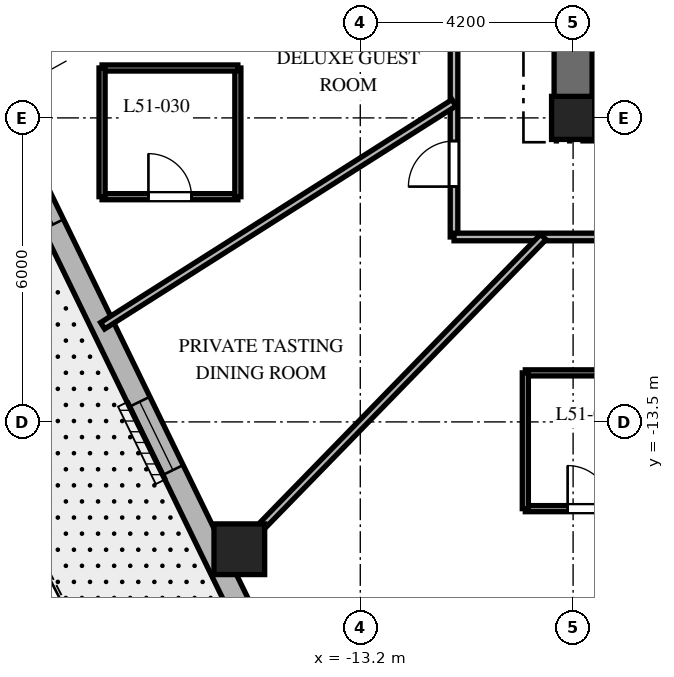
"""IFC4 building model, lengths in metres.
Left out: names, types, materials, properties, quantities, classifications, styles, units other than length and angle.
Written with IfcOpenShell. Run it as: python <this file> out.ifc"""

import sys

from ifc_helpers import new_model, si_unit, direction, frame, frame_2d, origin, origin_2d, place, context, subcontext, project, spatial, rectangle, extrude, element, fill, save


model = new_model("IFC4")
c1 = context("Model", 3, precision=1e-05, world=origin(), true_north=direction((0.0, 1.0)))
c2 = subcontext(c1, "Body", "Model", "MODEL_VIEW")
j1 = project(units=[si_unit("LENGTHUNIT", "METRE"), si_unit("PLANEANGLEUNIT", "RADIAN")], contexts=[c1])
p1 = place(None, origin())
s1 = spatial("IfcSite", under=j1, at=p1, CompositionType="ELEMENT")
p2 = place(p1, origin())
s2 = spatial("IfcBuilding", under=s1, at=p2, CompositionType="ELEMENT")
p3 = place(p2, frame((0.0, 0.0, 206.5)))
s3 = spatial("IfcBuildingStorey", under=s2, at=p3, CompositionType="ELEMENT", Elevation=206.5)
p4 = place(p3, frame((-9.375, -7.5, 0.0), z_axis=(0.0, 0.0, 1.0), x_axis=(1.0, 0.0, 0.0)))
e1 = element("IfcWall", 1, at=p4, inside=s3, PredefinedType="SHEAR", context=c2, shape_type="SweptSolid", body=[
    extrude(rectangle(XDim=18.75, YDim=0.75, at=frame_2d((9.375, 0.0))), origin(), (0.0, 0.0, 1.0), 3.8),
])
p5 = place(p4, frame((9.425, 0.0, 0.0)))
e2 = element("IfcOpeningElement", 2, at=p5, cuts=e1, PredefinedType="OPENING", context=c2, shape_type="SweptSolid", body=[
    extrude(rectangle(XDim=1.0, YDim=2.15, at=frame_2d((0.5, 1.075))), frame((0.0, 0.385, 0.0), z_axis=(0.0, -1.0, 0.0), x_axis=(1.0, 0.0, 0.0)), (0.0, 0.0, 1.0), 0.77),
])
p6 = place(p3, frame((-9.0, -7.125, 0.0), z_axis=(0.0, 0.0, 1.0), x_axis=(0.0, 1.0, 0.0)))
e3 = element("IfcWall", 3, at=p6, inside=s3, PredefinedType="SHEAR", context=c2, shape_type="SweptSolid", body=[
    extrude(rectangle(XDim=14.25, YDim=0.75, at=frame_2d((7.125, 0.0))), origin(), (0.0, 0.0, 1.0), 3.8),
])
p7 = place(p6, frame((10.25, 0.0, 0.0)))
e4 = element("IfcOpeningElement", 4, at=p7, cuts=e3, PredefinedType="OPENING", context=c2, shape_type="SweptSolid", body=[
    extrude(rectangle(XDim=1.05, YDim=2.15, at=frame_2d((0.525, 1.075))), frame((0.0, 0.385, 0.0), z_axis=(0.0, -1.0, 0.0), x_axis=(1.0, 0.0, 0.0)), (0.0, 0.0, 1.0), 0.77),
])
p8 = place(p3, frame((-9.0, -7.5, 0.0), z_axis=(0.0, 0.0, 1.0), x_axis=(1.0, 0.0, 0.0)))
e5 = element("IfcColumn", 5, at=p8, inside=s3, PredefinedType="COLUMN", context=c2, shape_type="SweptSolid", body=[
    extrude(rectangle(XDim=0.85, YDim=0.85, at=origin_2d()), origin(), (0.0, 0.0, 1.0), 3.8),
])
p9 = place(p3, frame((-15.587, -16.013, 0.0), z_axis=(0.0, 0.0, 1.0), x_axis=(1.0, 0.0, 0.0)))
e6 = element("IfcColumn", 6, at=p9, inside=s3, PredefinedType="COLUMN", context=c2, shape_type="SweptSolid", body=[
    extrude(rectangle(XDim=1.0, YDim=1.0, at=origin_2d()), origin(), (0.0, 0.0, 1.0), 3.8),
])
p10 = place(p3, frame((-22.74, -2.452, 0.0), z_axis=(0.0, 0.0, 1.0), x_axis=(0.437753424814, -0.899095066755, 0.0)))
e7 = element("IfcWall", 7, at=p10, inside=s3, PredefinedType="SOLIDWALL", context=c2, shape_type="SweptSolid", body=[
    extrude(rectangle(XDim=19.137, YDim=0.45, at=frame_2d((9.569, 0.0))), origin(), (0.0, 0.0, 1.0), 3.5),
])
p11 = place(p10, frame((4.763, 0.0, 0.0)))
e8 = element("IfcOpeningElement", 8, at=p11, cuts=e7, PredefinedType="OPENING", context=c2, shape_type="SweptSolid", body=[
    extrude(rectangle(XDim=0.95, YDim=2.15, at=frame_2d((0.475, 1.075))), frame((0.0, 0.235, 0.0), z_axis=(0.0, -1.0, 0.0), x_axis=(1.0, 0.0, 0.0)), (0.0, 0.0, 1.0), 0.47),
])
p12 = place(p10, frame((1.216, 0.0, 0.8)))
e9 = element("IfcOpeningElement", 9, at=p12, cuts=e7, PredefinedType="OPENING", context=c2, shape_type="SweptSolid", body=[
    extrude(rectangle(XDim=1.5, YDim=1.8, at=frame_2d((0.75, 0.9))), frame((0.0, 0.235, 0.0), z_axis=(0.0, -1.0, 0.0), x_axis=(1.0, 0.0, 0.0)), (0.0, 0.0, 1.0), 0.47),
])
p13 = place(p10, frame((6.451, 0.0, 0.8)))
e10 = element("IfcOpeningElement", 10, at=p13, cuts=e7, PredefinedType="OPENING", context=c2, shape_type="SweptSolid", body=[
    extrude(rectangle(XDim=1.5, YDim=1.8, at=frame_2d((0.75, 0.9))), frame((0.0, 0.235, 0.0), z_axis=(0.0, -1.0, 0.0), x_axis=(1.0, 0.0, 0.0)), (0.0, 0.0, 1.0), 0.47),
])
p14 = place(p10, frame((11.845, 0.0, 0.8)))
e11 = element("IfcOpeningElement", 11, at=p14, cuts=e7, PredefinedType="OPENING", context=c2, shape_type="SweptSolid", body=[
    extrude(rectangle(XDim=1.5, YDim=1.8, at=frame_2d((0.75, 0.9))), frame((0.0, 0.235, 0.0), z_axis=(0.0, -1.0, 0.0), x_axis=(1.0, 0.0, 0.0)), (0.0, 0.0, 1.0), 0.47),
])
p15 = place(p10, frame((16.473, 0.0, 0.8)))
e12 = element("IfcOpeningElement", 12, at=p15, cuts=e7, PredefinedType="OPENING", context=c2, shape_type="SweptSolid", body=[
    extrude(rectangle(XDim=1.5, YDim=1.8, at=frame_2d((0.75, 0.9))), frame((0.0, 0.235, 0.0), z_axis=(0.0, -1.0, 0.0), x_axis=(1.0, 0.0, 0.0)), (0.0, 0.0, 1.0), 0.47),
])
p16 = place(p3, frame((-11.35, -9.85, 0.0), z_axis=(0.0, 0.0, 1.0), x_axis=(0.0, 1.0, 0.0)))
e13 = element("IfcWall", 13, at=p16, inside=s3, PredefinedType="PARTITIONING", context=c2, shape_type="SweptSolid", body=[
    extrude(rectangle(XDim=12.4, YDim=0.15, at=frame_2d((6.2, 0.0))), origin(), (0.0, 0.0, 1.0), 2.99),
])
p17 = place(p16, frame((8.835, 0.0, 0.0)))
e14 = element("IfcOpeningElement", 14, at=p17, cuts=e13, PredefinedType="OPENING", context=c2, shape_type="SweptSolid", body=[
    extrude(rectangle(XDim=0.95, YDim=2.03, at=frame_2d((0.475, 1.015))), frame((0.0, 0.085, 0.0), z_axis=(0.0, -1.0, 0.0), x_axis=(1.0, 0.0, 0.0)), (0.0, 0.0, 1.0), 0.17),
])
p18 = place(p16, frame((4.191, 0.0, 0.0)))
e15 = element("IfcOpeningElement", 15, at=p18, cuts=e13, PredefinedType="OPENING", context=c2, shape_type="SweptSolid", body=[
    extrude(rectangle(XDim=0.95, YDim=2.03, at=frame_2d((0.475, 1.015))), frame((0.0, 0.085, 0.0), z_axis=(0.0, -1.0, 0.0), x_axis=(1.0, 0.0, 0.0)), (0.0, 0.0, 1.0), 0.17),
])
p19 = place(p16, frame((0.994, 0.0, 0.0)))
e16 = element("IfcOpeningElement", 16, at=p19, cuts=e13, PredefinedType="OPENING", context=c2, shape_type="SweptSolid", body=[
    extrude(rectangle(XDim=0.9, YDim=2.03, at=frame_2d((0.45, 1.015))), frame((0.0, 0.085, 0.0), z_axis=(0.0, -1.0, 0.0), x_axis=(1.0, 0.0, 0.0)), (0.0, 0.0, 1.0), 0.17),
])
p20 = place(p3, frame((-0.92, -9.85, 0.0), z_axis=(0.0, 0.0, 1.0), x_axis=(-1.0, 0.0, 0.0)))
e17 = element("IfcWall", 17, at=p20, inside=s3, PredefinedType="PARTITIONING", context=c2, shape_type="SweptSolid", body=[
    extrude(rectangle(XDim=10.43, YDim=0.15, at=frame_2d((5.215, 0.0))), origin(), (0.0, 0.0, 1.0), 2.99),
])
p21 = place(p20, frame((4.949, 0.0, 0.0)))
e18 = element("IfcOpeningElement", 18, at=p21, cuts=e17, PredefinedType="OPENING", context=c2, shape_type="SweptSolid", body=[
    extrude(rectangle(XDim=0.95, YDim=2.03, at=frame_2d((0.475, 1.015))), frame((0.0, 0.085, 0.0), z_axis=(0.0, -1.0, 0.0), x_axis=(1.0, 0.0, 0.0)), (0.0, 0.0, 1.0), 0.17),
])
p22 = place(p3, frame((-11.35, -7.202, 0.0), z_axis=(0.0, 0.0, 1.0), x_axis=(-0.844364592263, -0.535769013039, 0.0)))
e19 = element("IfcWall", 19, at=p22, inside=s3, PredefinedType="PARTITIONING", context=c2, shape_type="SweptSolid", body=[
    extrude(rectangle(XDim=8.213, YDim=0.15, at=frame_2d((4.106, 0.0))), origin(), (0.0, 0.0, 1.0), 2.74),
])
p23 = place(p3, frame((-9.588, -9.85, 0.0), z_axis=(0.0, 0.0, 1.0), x_axis=(-0.697519469595, -0.716565830567, 0.0)))
e20 = element("IfcWall", 20, at=p23, inside=s3, PredefinedType="PARTITIONING", context=c2, shape_type="SweptSolid", body=[
    extrude(rectangle(XDim=9.126, YDim=0.15, at=frame_2d((4.563, 0.0))), origin(), (0.0, 0.0, 1.0), 2.74),
])
p24 = place(p3, frame((-18.296, -9.055, 0.0), z_axis=(0.0, 0.0, 1.0), x_axis=(1.0, 0.0, 0.0)))
e21 = element("IfcWall", 21, at=p24, inside=s3, PredefinedType="PARTITIONING", context=c2, shape_type="SweptSolid", body=[
    extrude(rectangle(XDim=2.68, YDim=0.12, at=frame_2d((1.34, 0.0))), origin(), (0.0, 0.0, 1.0), 3.027),
])
p25 = place(p24, frame((0.915, 0.0, 0.0)))
e22 = element("IfcOpeningElement", 22, at=p25, cuts=e21, PredefinedType="OPENING", context=c2, shape_type="SweptSolid", body=[
    extrude(rectangle(XDim=0.85, YDim=2.03, at=frame_2d((0.425, 1.015))), frame((0.0, 0.07, 0.0), z_axis=(0.0, -1.0, 0.0), x_axis=(1.0, 0.0, 0.0)), (0.0, 0.0, 1.0), 0.14),
])
p26 = place(p3, frame((-15.616, -9.055, 0.0), z_axis=(0.0, 0.0, 1.0), x_axis=(0.0, 1.0, 0.0)))
e23 = element("IfcWall", 23, at=p26, inside=s3, PredefinedType="PARTITIONING", context=c2, shape_type="SweptSolid", body=[
    extrude(rectangle(XDim=2.54, YDim=0.12, at=frame_2d((1.27, 0.0))), origin(), (0.0, 0.0, 1.0), 2.99),
])
p27 = place(p3, frame((-15.616, -6.515, 0.0), z_axis=(0.0, 0.0, 1.0), x_axis=(-1.0, 0.0, 0.0)))
e24 = element("IfcWall", 24, at=p27, inside=s3, PredefinedType="PARTITIONING", context=c2, shape_type="SweptSolid", body=[
    extrude(rectangle(XDim=2.68, YDim=0.12, at=frame_2d((1.34, 0.0))), origin(), (0.0, 0.0, 1.0), 2.99),
])
p28 = place(p3, frame((-18.296, -6.515, 0.0), z_axis=(0.0, 0.0, 1.0), x_axis=(0.0, -1.0, 0.0)))
e25 = element("IfcWall", 25, at=p28, inside=s3, PredefinedType="PARTITIONING", context=c2, shape_type="SweptSolid", body=[
    extrude(rectangle(XDim=2.54, YDim=0.12, at=frame_2d((1.27, 0.0))), origin(), (0.0, 0.0, 1.0), 3.5),
])
p29 = place(p3, frame((-9.943, -15.212, 0.0), z_axis=(0.0, 0.0, 1.0), x_axis=(1.0, 0.0, 0.0)))
e26 = element("IfcWall", 26, at=p29, inside=s3, PredefinedType="PARTITIONING", context=c2, shape_type="SweptSolid", body=[
    extrude(rectangle(XDim=2.52, YDim=0.12, at=frame_2d((1.26, 0.0))), origin(), (0.0, 0.0, 1.0), 3.073),
])
p30 = place(p29, frame((0.835, 0.0, 0.0)))
e27 = element("IfcOpeningElement", 27, at=p30, cuts=e26, PredefinedType="OPENING", context=c2, shape_type="SweptSolid", body=[
    extrude(rectangle(XDim=0.85, YDim=2.03, at=frame_2d((0.425, 1.015))), frame((0.0, 0.07, 0.0), z_axis=(0.0, -1.0, 0.0), x_axis=(1.0, 0.0, 0.0)), (0.0, 0.0, 1.0), 0.14),
])
p31 = place(p3, frame((-7.423, -12.532, 0.0), z_axis=(0.0, 0.0, 1.0), x_axis=(-1.0, 0.0, 0.0)))
e28 = element("IfcWall", 28, at=p31, inside=s3, PredefinedType="PARTITIONING", context=c2, shape_type="SweptSolid", body=[
    extrude(rectangle(XDim=2.52, YDim=0.12, at=frame_2d((1.26, 0.0))), origin(), (0.0, 0.0, 1.0), 2.94),
])
p32 = place(p3, frame((-9.943, -12.532, 0.0), z_axis=(0.0, 0.0, 1.0), x_axis=(0.0, -1.0, 0.0)))
e29 = element("IfcWall", 29, at=p32, inside=s3, PredefinedType="PARTITIONING", context=c2, shape_type="SweptSolid", body=[
    extrude(rectangle(XDim=2.68, YDim=0.12, at=frame_2d((1.34, 0.0))), origin(), (0.0, 0.0, 1.0), 3.073),
])
p33 = place(p13, origin())
e30 = element("IfcWindow", 30, at=p33, inside=s3, PartitioningType="SINGLE_PANEL", PredefinedType="WINDOW", context=c2, shape_type="SweptSolid", body=[
    extrude(rectangle(XDim=1.5, YDim=1.8, at=frame_2d((0.75, 0.9))), frame((0.0, 0.03, 0.0), z_axis=(0.0, -1.0, 0.0), x_axis=(1.0, 0.0, 0.0)), (0.0, 0.0, 1.0), 0.06),
])
fill(e10, e30)
p34 = place(p14, origin())
e31 = element("IfcWindow", 31, at=p34, inside=s3, PartitioningType="SINGLE_PANEL", PredefinedType="WINDOW", context=c2, shape_type="SweptSolid", body=[
    extrude(rectangle(XDim=1.5, YDim=1.8, at=frame_2d((0.75, 0.9))), frame((0.0, 0.03, 0.0), z_axis=(0.0, -1.0, 0.0), x_axis=(1.0, 0.0, 0.0)), (0.0, 0.0, 1.0), 0.06),
])
fill(e11, e31)
p35 = place(p25, origin())
e32 = element("IfcDoor", 32, at=p35, inside=s3, OperationType="SINGLE_SWING_LEFT", PredefinedType="DOOR", context=c2, shape_type="SweptSolid", body=[
    extrude(rectangle(XDim=0.85, YDim=2.03, at=frame_2d((0.425, 1.015))), frame((0.0, 0.025, 0.0), z_axis=(0.0, -1.0, 0.0), x_axis=(1.0, 0.0, 0.0)), (0.0, 0.0, 1.0), 0.05),
])
fill(e22, e32)
p36 = place(p19, origin())
e33 = element("IfcDoor", 33, at=p36, inside=s3, OperationType="SINGLE_SWING_LEFT", PredefinedType="DOOR", context=c2, shape_type="SweptSolid", body=[
    extrude(rectangle(XDim=0.9, YDim=2.03, at=frame_2d((0.45, 1.015))), frame((0.0, 0.025, 0.0), z_axis=(0.0, -1.0, 0.0), x_axis=(1.0, 0.0, 0.0)), (0.0, 0.0, 1.0), 0.05),
])
fill(e16, e33)
p37 = place(p30, origin())
e34 = element("IfcDoor", 34, at=p37, inside=s3, OperationType="SINGLE_SWING_LEFT", PredefinedType="DOOR", context=c2, shape_type="SweptSolid", body=[
    extrude(rectangle(XDim=0.85, YDim=2.03, at=frame_2d((0.425, 1.015))), frame((0.0, 0.025, 0.0), z_axis=(0.0, -1.0, 0.0), x_axis=(1.0, 0.0, 0.0)), (0.0, 0.0, 1.0), 0.05),
])
fill(e27, e34)
save(model, sys.argv[1])
